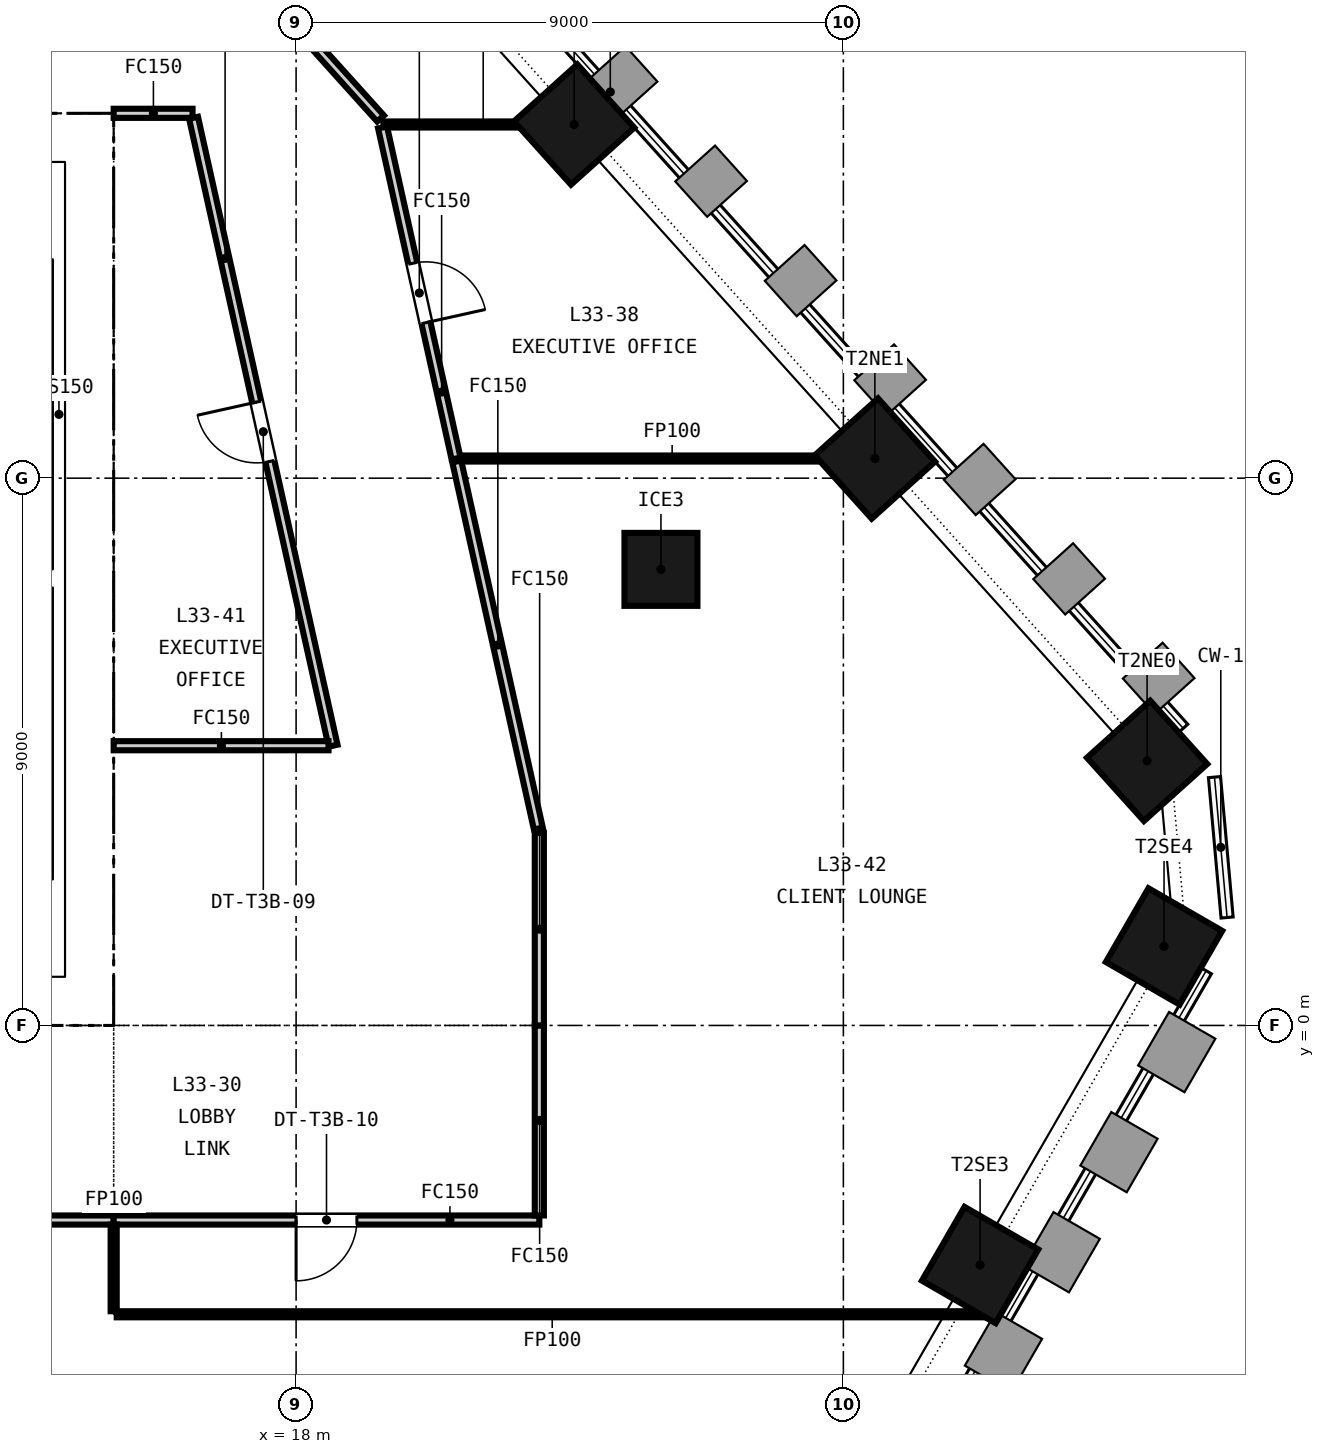
"""IFC4 building model, lengths in metres.
Left out: names, types, materials, properties, quantities, classifications, styles, units other than length and angle.
Written with IfcOpenShell. Run it as: python <this file> out.ifc"""

import sys

from ifc_helpers import new_model, si_unit, direction, frame, frame_2d, origin, origin_2d, place, context, subcontext, project, spatial, rectangle, extrude, element, fill, save


model = new_model("IFC4")
c1 = context("Model", 3, precision=1e-05, world=origin(), true_north=direction((0.0, 1.0)))
c2 = subcontext(c1, "Body", "Model", "MODEL_VIEW")
j1 = project(units=[si_unit("LENGTHUNIT", "METRE"), si_unit("PLANEANGLEUNIT", "RADIAN")], contexts=[c1])
p1 = place(None, origin())
s1 = spatial("IfcSite", under=j1, at=p1, CompositionType="ELEMENT")
p2 = place(p1, origin())
s2 = spatial("IfcBuilding", under=s1, at=p2, CompositionType="ELEMENT")
p3 = place(p2, frame((0.0, 0.0, 137.1)))
s3 = spatial("IfcBuildingStorey", under=s2, at=p3, CompositionType="ELEMENT", Elevation=137.1)
p4 = place(p3, frame((-15.0, 0.4, -0.15), z_axis=(0.0, 0.0, 1.0), x_axis=(1.0, 0.0, 0.0)))
e1 = element("IfcWall", 1, at=p4, inside=s3, PredefinedType="SOLIDWALL", context=c2, shape_type="SweptSolid", body=[
    extrude(rectangle(XDim=30.0, YDim=0.8, at=frame_2d((15.0, 0.0))), origin(), (0.0, 0.0, 1.0), 3.65),
])
p5 = place(p4, frame((5.8, 0.0, 0.15)))
e2 = element("IfcOpeningElement", 2, at=p5, cuts=e1, PredefinedType="OPENING", context=c2, shape_type="SweptSolid", body=[
    extrude(rectangle(XDim=2.4, YDim=2.4, at=frame_2d((1.2, 1.2))), frame((0.0, 0.41, 0.0), z_axis=(0.0, -1.0, 0.0), x_axis=(1.0, 0.0, 0.0)), (0.0, 0.0, 1.0), 0.82),
])
p6 = place(p4, frame((13.8, 0.0, 0.15)))
e3 = element("IfcOpeningElement", 3, at=p6, cuts=e1, PredefinedType="OPENING", context=c2, shape_type="SweptSolid", body=[
    extrude(rectangle(XDim=2.4, YDim=2.4, at=frame_2d((1.2, 1.2))), frame((0.0, 0.41, 0.0), z_axis=(0.0, -1.0, 0.0), x_axis=(1.0, 0.0, 0.0)), (0.0, 0.0, 1.0), 0.82),
])
p7 = place(p4, frame((21.8, 0.0, 0.15)))
e4 = element("IfcOpeningElement", 4, at=p7, cuts=e1, PredefinedType="OPENING", context=c2, shape_type="SweptSolid", body=[
    extrude(rectangle(XDim=2.4, YDim=2.4, at=frame_2d((1.2, 1.2))), frame((0.0, 0.41, 0.0), z_axis=(0.0, -1.0, 0.0), x_axis=(1.0, 0.0, 0.0)), (0.0, 0.0, 1.0), 0.82),
])
p8 = place(p4, frame((1.5, 0.0, 0.15)))
e5 = element("IfcOpeningElement", 5, at=p8, cuts=e1, PredefinedType="OPENING", context=c2, shape_type="SweptSolid", body=[
    extrude(rectangle(XDim=1.2, YDim=2.1, at=frame_2d((0.6, 1.05))), frame((0.0, 0.41, 0.0), z_axis=(0.0, -1.0, 0.0), x_axis=(1.0, 0.0, 0.0)), (0.0, 0.0, 1.0), 0.82),
])
p9 = place(p4, frame((27.3, 0.0, 0.15)))
e6 = element("IfcOpeningElement", 6, at=p9, cuts=e1, PredefinedType="OPENING", context=c2, shape_type="SweptSolid", body=[
    extrude(rectangle(XDim=1.2, YDim=2.1, at=frame_2d((0.6, 1.05))), frame((0.0, 0.41, 0.0), z_axis=(0.0, -1.0, 0.0), x_axis=(1.0, 0.0, 0.0)), (0.0, 0.0, 1.0), 0.82),
])
p10 = place(p3, frame((-15.0, 14.6, -0.15), z_axis=(0.0, 0.0, 1.0), x_axis=(1.0, 0.0, 0.0)))
e7 = element("IfcWall", 7, at=p10, inside=s3, PredefinedType="SOLIDWALL", context=c2, shape_type="SweptSolid", body=[
    extrude(rectangle(XDim=30.0, YDim=0.8, at=frame_2d((15.0, 0.0))), origin(), (0.0, 0.0, 1.0), 3.65),
])
p11 = place(p10, frame((9.25, 0.0, 0.15)))
e8 = element("IfcOpeningElement", 8, at=p11, cuts=e7, PredefinedType="OPENING", context=c2, shape_type="SweptSolid", body=[
    extrude(rectangle(XDim=1.5, YDim=2.1, at=frame_2d((0.75, 1.05))), frame((0.0, 0.41, 0.0), z_axis=(0.0, -1.0, 0.0), x_axis=(1.0, 0.0, 0.0)), (0.0, 0.0, 1.0), 0.82),
])
p12 = place(p10, frame((19.4, 0.0, 0.15)))
e9 = element("IfcOpeningElement", 9, at=p12, cuts=e7, PredefinedType="OPENING", context=c2, shape_type="SweptSolid", body=[
    extrude(rectangle(XDim=1.5, YDim=2.1, at=frame_2d((0.75, 1.05))), frame((0.0, 0.41, 0.0), z_axis=(0.0, -1.0, 0.0), x_axis=(1.0, 0.0, 0.0)), (0.0, 0.0, 1.0), 0.82),
])
p13 = place(p10, frame((1.5, 0.0, 0.15)))
e10 = element("IfcOpeningElement", 10, at=p13, cuts=e7, PredefinedType="OPENING", context=c2, shape_type="SweptSolid", body=[
    extrude(rectangle(XDim=1.2, YDim=2.1, at=frame_2d((0.6, 1.05))), frame((0.0, 0.41, 0.0), z_axis=(0.0, -1.0, 0.0), x_axis=(1.0, 0.0, 0.0)), (0.0, 0.0, 1.0), 0.82),
])
p14 = place(p10, frame((27.3, 0.0, 0.15)))
e11 = element("IfcOpeningElement", 11, at=p14, cuts=e7, PredefinedType="OPENING", context=c2, shape_type="SweptSolid", body=[
    extrude(rectangle(XDim=1.2, YDim=2.1, at=frame_2d((0.6, 1.05))), frame((0.0, 0.41, 0.0), z_axis=(0.0, -1.0, 0.0), x_axis=(1.0, 0.0, 0.0)), (0.0, 0.0, 1.0), 0.82),
])
p15 = place(p3, frame((14.6, 0.8, -0.15), z_axis=(0.0, 0.0, 1.0), x_axis=(0.0, 1.0, 0.0)))
e12 = element("IfcWall", 12, at=p15, inside=s3, PredefinedType="SOLIDWALL", context=c2, shape_type="SweptSolid", body=[
    extrude(rectangle(XDim=13.4, YDim=0.8, at=frame_2d((6.7, 0.0))), origin(), (0.0, 0.0, 1.0), 3.65),
])
for number, where, z_axis, x_axis in (
    (13, (29.248, -3.94, -0.15), (0.0, 0.0, 1.0), (0.5, 0.866, 0.0)),
    (14, (32.273, 1.299, -0.15), (0.0, 0.0, 1.0), (0.5, 0.866, 0.0)),
    (15, (31.995, 4.351, -0.15), (0.0, 0.0, 1.0), (-0.669, 0.743, 0.0)),
    (16, (27.518, 9.323, -0.15), (0.0, 0.0, 1.0), (-0.669, 0.743, 0.0)),
    (17, (22.573, 14.816, -0.15), (0.0, 0.0, 1.0), (-0.669, 0.743, 0.0)),
):
    element("IfcColumn", number, at=place(p3, frame(where, z_axis=z_axis, x_axis=x_axis)), inside=s3, PredefinedType="COLUMN", context=c2, shape_type="SweptSolid", body=[
        extrude(rectangle(XDim=1.4, YDim=1.4, at=origin_2d()), origin(), (0.0, 0.0, 1.0), 3.65),
    ])
p16 = place(p3, frame((24.0, 7.5, -0.15), z_axis=(0.0, 0.0, 1.0), x_axis=(1.0, 0.0, 0.0)))
e18 = element("IfcColumn", 18, at=p16, inside=s3, PredefinedType="COLUMN", context=c2, shape_type="SweptSolid", body=[
    extrude(rectangle(XDim=1.2, YDim=1.2, at=origin_2d()), origin(), (0.0, 0.0, 1.0), 3.65),
])
p17 = place(p3, frame((11.05, 7.35, 0.0), z_axis=(0.0, 0.0, 1.0), x_axis=(1.0, 0.0, 0.0)))
e19 = element("IfcWall", 19, at=p17, inside=s3, PredefinedType="SOLIDWALL", context=c2, shape_type="SweptSolid", body=[
    extrude(rectangle(XDim=2.95, YDim=0.3, at=frame_2d((1.475, 0.0))), origin(), (0.0, 0.0, 1.0), 3.5),
])
p18 = place(p3, frame((14.1, 0.8, 0.0), z_axis=(0.0, 0.0, 1.0), x_axis=(0.0, 1.0, 0.0)))
e20 = element("IfcWall", 20, at=p18, inside=s3, PredefinedType="SOLIDWALL", context=c2, shape_type="SweptSolid", body=[
    extrude(rectangle(XDim=13.4, YDim=0.2, at=frame_2d((6.7, 0.0))), origin(), (0.0, 0.0, 1.0), 3.5),
])
p19 = place(p3, frame((15.0, -3.2, 0.0), z_axis=(0.0, 0.0, 1.0), x_axis=(-1.0, 0.0, 0.0)))
e21 = element("IfcWall", 21, at=p19, inside=s3, PredefinedType="PARTITIONING", context=c2, shape_type="SweptSolid", body=[
    extrude(rectangle(XDim=15.617, YDim=0.15, at=frame_2d((7.809, 0.0))), origin(), (0.0, 0.0, 1.0), 2.741),
])
p20 = place(p19, frame((6.908, 0.0, 0.0)))
e22 = element("IfcOpeningElement", 22, at=p20, cuts=e21, PredefinedType="OPENING", context=c2, shape_type="SweptSolid", body=[
    extrude(rectangle(XDim=1.8, YDim=2.1, at=frame_2d((0.9, 1.05))), frame((0.0, 0.085, 0.0), z_axis=(0.0, -1.0, 0.0), x_axis=(1.0, 0.0, 0.0)), (0.0, 0.0, 1.0), 0.17),
])
p21 = place(p3, frame((22.0, -3.2, 0.0), z_axis=(0.0, 0.0, 1.0), x_axis=(-1.0, 0.0, 0.0)))
e23 = element("IfcWall", 23, at=p21, inside=s3, PredefinedType="PARTITIONING", context=c2, shape_type="SweptSolid", body=[
    extrude(rectangle(XDim=7.0, YDim=0.15, at=frame_2d((3.5, 0.0))), origin(), (0.0, 0.0, 1.0), 2.741),
])
p22 = place(p21, frame((3.0, 0.0, 0.0)))
e24 = element("IfcOpeningElement", 24, at=p22, cuts=e23, PredefinedType="OPENING", context=c2, shape_type="SweptSolid", body=[
    extrude(rectangle(XDim=1.0, YDim=2.1, at=frame_2d((0.5, 1.05))), frame((0.0, 0.085, 0.0), z_axis=(0.0, -1.0, 0.0), x_axis=(1.0, 0.0, 0.0)), (0.0, 0.0, 1.0), 0.17),
])
p23 = place(p3, frame((22.0, 0.0, 0.0), z_axis=(0.0, 0.0, 1.0), x_axis=(0.0, -1.0, 0.0)))
e25 = element("IfcWall", 25, at=p23, inside=s3, PredefinedType="PARTITIONING", context=c2, shape_type="SweptSolid", body=[
    extrude(rectangle(XDim=3.125, YDim=0.15, at=frame_2d((1.562, 0.0))), origin(), (0.0, 0.0, 1.0), 2.741),
])
p24 = place(p3, frame((16.297, 15.0, 0.0), z_axis=(0.0, 0.0, 1.0), x_axis=(-1.0, 0.0, 0.0)))
e26 = element("IfcWall", 26, at=p24, inside=s3, PredefinedType="PARTITIONING", context=c2, shape_type="SweptSolid", body=[
    extrude(rectangle(XDim=1.297, YDim=0.15, at=frame_2d((0.648, 0.0))), origin(), (0.0, 0.0, 1.0), 2.741),
])
p25 = place(p3, frame((18.608, 4.6, 0.0), z_axis=(0.0, 0.0, 1.0), x_axis=(-0.21691823958, 0.976189775268, 0.0)))
e27 = element("IfcWall", 27, at=p25, inside=s3, PredefinedType="PARTITIONING", context=c2, shape_type="SweptSolid", body=[
    extrude(rectangle(XDim=10.579, YDim=0.15, at=frame_2d((5.289, 0.0))), origin(), (0.0, 0.0, 1.0), 2.741),
])
p26 = place(p25, frame((4.789, 0.0, 0.0)))
e28 = element("IfcOpeningElement", 28, at=p26, cuts=e27, PredefinedType="OPENING", context=c2, shape_type="SweptSolid", body=[
    extrude(rectangle(XDim=1.0, YDim=2.1, at=frame_2d((0.5, 1.05))), frame((0.0, 0.085, 0.0), z_axis=(0.0, -1.0, 0.0), x_axis=(1.0, 0.0, 0.0)), (0.0, 0.0, 1.0), 0.17),
])
p27 = place(p3, frame((22.0, 3.165, 0.0), z_axis=(0.0, 0.0, 1.0), x_axis=(0.0, -1.0, 0.0)))
e29 = element("IfcWall", 29, at=p27, inside=s3, PredefinedType="PARTITIONING", context=c2, shape_type="SweptSolid", body=[
    extrude(rectangle(XDim=3.165, YDim=0.15, at=frame_2d((1.583, 0.0))), origin(), (0.0, 0.0, 1.0), 2.741),
])
p28 = place(p3, frame((16.66, 17.944, 0.0), z_axis=(0.0, 0.0, 1.0), x_axis=(0.669169786575, -0.743109545582, 0.0)))
e30 = element("IfcWall", 30, at=p28, inside=s3, PredefinedType="PARTITIONING", context=c2, shape_type="SweptSolid", body=[
    extrude(rectangle(XDim=4.078, YDim=0.15, at=frame_2d((2.039, 0.0))), origin(), (0.0, 0.0, 1.0), 2.741),
])
p29 = place(p3, frame((19.437, 14.816, 0.0), z_axis=(0.0, 0.0, 1.0), x_axis=(1.0, 0.0, 0.0)))
e31 = element("IfcWall", 31, at=p29, inside=s3, PredefinedType="PARTITIONING", context=c2, shape_type="SweptSolid", body=[
    extrude(rectangle(XDim=3.271, YDim=0.1, at=frame_2d((1.635, 0.0))), origin(), (0.0, 0.0, 1.0), 2.741),
])
p30 = place(p3, frame((19.422, 14.767, 0.0), z_axis=(0.0, 0.0, 1.0), x_axis=(0.216833114764, -0.976208686881, 0.0)))
e32 = element("IfcWall", 32, at=p30, inside=s3, PredefinedType="PARTITIONING", context=c2, shape_type="SweptSolid", body=[
    extrude(rectangle(XDim=5.577, YDim=0.15, at=frame_2d((2.788, 0.0))), origin(), (0.0, 0.0, 1.0), 2.741),
])
p31 = place(p30, frame((2.288, 0.0, 0.0)))
e33 = element("IfcOpeningElement", 33, at=p31, cuts=e32, PredefinedType="OPENING", context=c2, shape_type="SweptSolid", body=[
    extrude(rectangle(XDim=1.0, YDim=2.1, at=frame_2d((0.5, 1.05))), frame((0.0, 0.085, 0.0), z_axis=(0.0, -1.0, 0.0), x_axis=(1.0, 0.0, 0.0)), (0.0, 0.0, 1.0), 0.17),
])
p32 = place(p3, frame((20.706, 9.323, 0.0), z_axis=(0.0, 0.0, 1.0), x_axis=(1.0, 0.0, 0.0)))
e34 = element("IfcWall", 34, at=p32, inside=s3, PredefinedType="PARTITIONING", context=c2, shape_type="SweptSolid", body=[
    extrude(rectangle(XDim=6.946, YDim=0.1, at=frame_2d((3.473, 0.0))), origin(), (0.0, 0.0, 1.0), 2.741),
])
p33 = place(p3, frame((15.0, 4.6, 0.0), z_axis=(0.0, 0.0, 1.0), x_axis=(1.0, 0.0, 0.0)))
e35 = element("IfcWall", 35, at=p33, inside=s3, PredefinedType="PARTITIONING", context=c2, shape_type="SweptSolid", body=[
    extrude(rectangle(XDim=3.533, YDim=0.15, at=frame_2d((1.767, 0.0))), origin(), (0.0, 0.0, 1.0), 2.741),
])
p34 = place(p3, frame((20.642, 9.274, 0.0), z_axis=(0.0, 0.0, 1.0), x_axis=(0.217005709604, -0.976170334521, 0.0)))
e36 = element("IfcWall", 36, at=p34, inside=s3, PredefinedType="PARTITIONING", context=c2, shape_type="SweptSolid", body=[
    extrude(rectangle(XDim=6.183, YDim=0.15, at=frame_2d((3.092, 0.0))), origin(), (0.0, 0.0, 1.0), 2.741),
])
p35 = place(p3, frame((15.05, -4.75, 0.0), z_axis=(0.0, 0.0, 1.0), x_axis=(1.0, 0.0, 0.0)))
e37 = element("IfcWall", 37, at=p35, inside=s3, PredefinedType="PARTITIONING", context=c2, shape_type="SweptSolid", body=[
    extrude(rectangle(XDim=14.314, YDim=0.1, at=frame_2d((7.157, 0.0))), origin(), (0.0, 0.0, 1.0), 2.741),
])
p36 = place(p3, frame((15.0, -4.7, 0.0), z_axis=(0.0, 0.0, 1.0), x_axis=(0.0, 1.0, 0.0)))
e38 = element("IfcWall", 38, at=p36, inside=s3, PredefinedType="PARTITIONING", context=c2, shape_type="SweptSolid", body=[
    extrude(rectangle(XDim=1.425, YDim=0.1, at=frame_2d((0.712, 0.0))), origin(), (0.0, 0.0, 1.0), 2.741),
])
p37 = place(p31, origin())
e39 = element("IfcDoor", 39, at=p37, inside=s3, OperationType="SINGLE_SWING_RIGHT", PredefinedType="DOOR", context=c2, shape_type="SweptSolid", body=[
    extrude(rectangle(XDim=1.0, YDim=2.1, at=frame_2d((0.5, 1.05))), frame((0.0, 0.025, 0.0), z_axis=(0.0, -1.0, 0.0), x_axis=(1.0, 0.0, 0.0)), (0.0, 0.0, 1.0), 0.05),
])
fill(e33, e39)
p38 = place(p26, origin())
e40 = element("IfcDoor", 40, at=p38, inside=s3, OperationType="SINGLE_SWING_RIGHT", PredefinedType="DOOR", context=c2, shape_type="SweptSolid", body=[
    extrude(rectangle(XDim=1.0, YDim=2.1, at=frame_2d((0.5, 1.05))), frame((0.0, 0.025, 0.0), z_axis=(0.0, -1.0, 0.0), x_axis=(1.0, 0.0, 0.0)), (0.0, 0.0, 1.0), 0.05),
])
fill(e28, e40)
p39 = place(p22, origin())
e41 = element("IfcDoor", 41, at=p39, inside=s3, OperationType="SINGLE_SWING_RIGHT", PredefinedType="DOOR", context=c2, shape_type="SweptSolid", body=[
    extrude(rectangle(XDim=1.0, YDim=2.1, at=frame_2d((0.5, 1.05))), frame((0.0, 0.025, 0.0), z_axis=(0.0, -1.0, 0.0), x_axis=(1.0, 0.0, 0.0)), (0.0, 0.0, 1.0), 0.05),
])
fill(e24, e41)
save(model, sys.argv[1])
